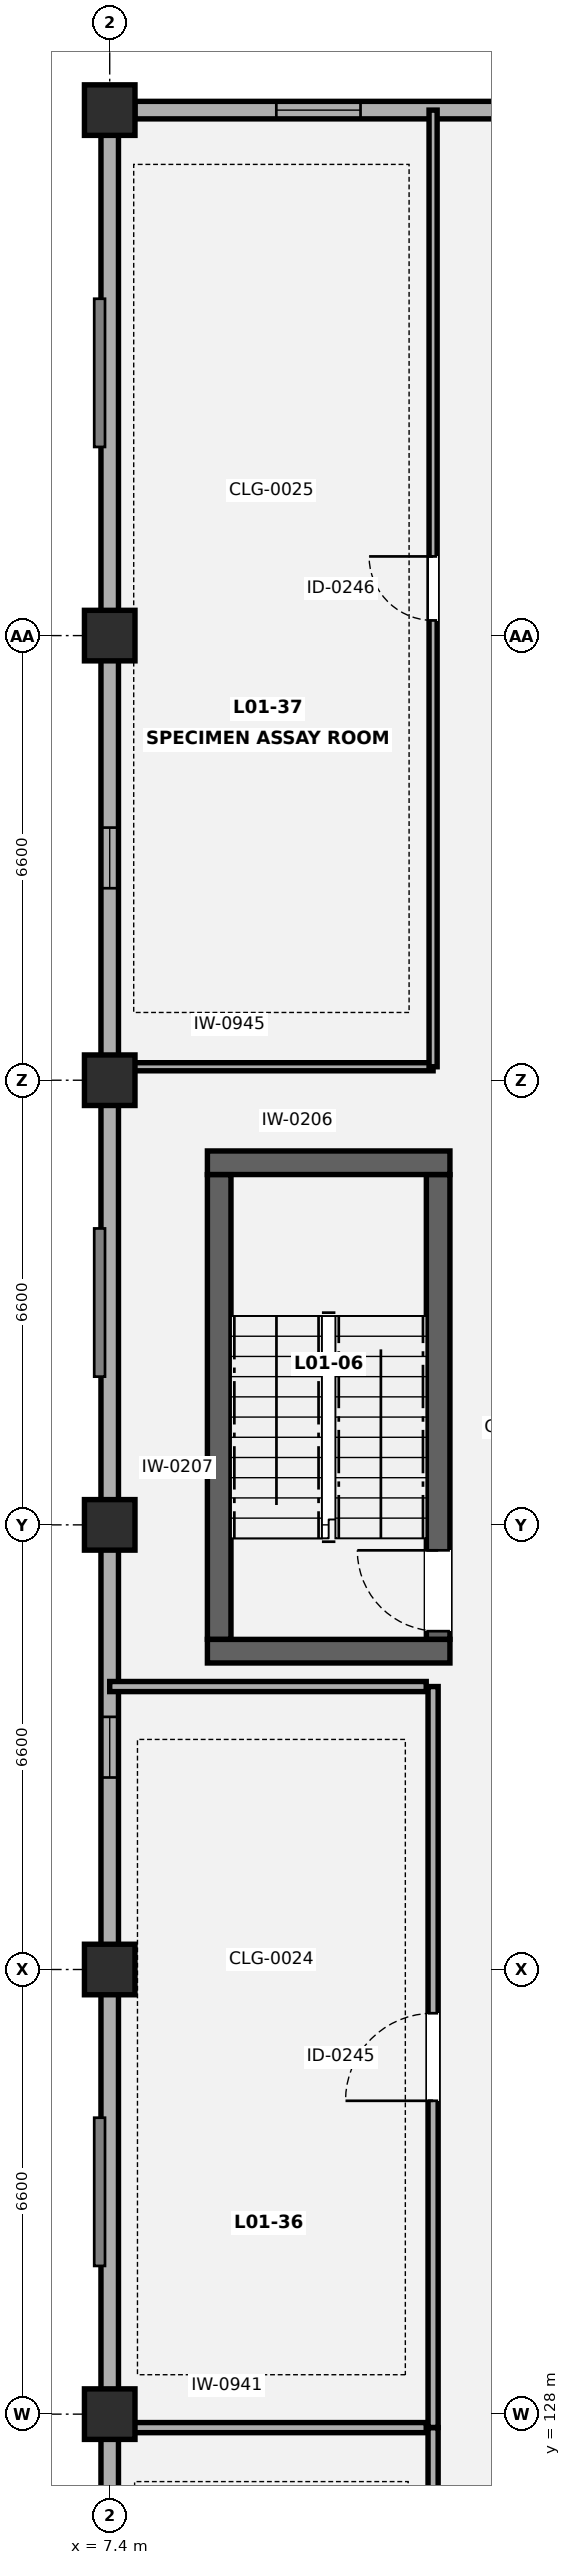
"""IFC4 building model, lengths in metres.
Left out: names, types, materials, properties, quantities, classifications, styles, units other than length and angle.
Written with IfcOpenShell. Run it as: python <this file> out.ifc"""

import sys

from ifc_helpers import new_model, si_unit, direction, frame, frame_2d, origin, origin_2d, place, context, subcontext, project, spatial, rectangle, extrude, element, fill, save


model = new_model("IFC4")
c1 = context("Model", 3, precision=1e-05, world=origin(), true_north=direction((0.0, 1.0)))
c2 = subcontext(c1, "Body", "Model", "MODEL_VIEW")
j1 = project(units=[si_unit("LENGTHUNIT", "METRE"), si_unit("PLANEANGLEUNIT", "RADIAN")], contexts=[c1])
p1 = place(None, origin())
s1 = spatial("IfcSite", under=j1, at=p1, CompositionType="ELEMENT")
p2 = place(p1, origin())
s2 = spatial("IfcBuilding", under=s1, at=p2, CompositionType="ELEMENT")
p3 = place(p2, frame((0.0, 0.0, 4.9)))
s3 = spatial("IfcBuildingStorey", under=s2, at=p3, CompositionType="ELEMENT", Elevation=4.9)
for number, where, z_axis, x_axis in (
    (1, (7.4, 128.0, 0.0), (0.0, 0.0, 1.0), (1.0, 0.0, 0.0)),
    (2, (7.4, 134.6, 0.0), (0.0, 0.0, 1.0), (1.0, 0.0, 0.0)),
    (3, (7.4, 141.2, 0.0), (0.0, 0.0, 1.0), (1.0, 0.0, 0.0)),
    (4, (7.4, 147.8, 0.0), (0.0, 0.0, 1.0), (1.0, 0.0, 0.0)),
    (5, (7.4, 154.4, 0.0), (0.0, 0.0, 1.0), (1.0, 0.0, 0.0)),
    (6, (7.4, 162.2, 0.0), (0.0, 0.0, 1.0), (1.0, 0.0, 0.0)),
):
    element("IfcColumn", number, at=place(p3, frame(where, z_axis=z_axis, x_axis=x_axis)), inside=s3, PredefinedType="COLUMN", context=c2, shape_type="SweptSolid", body=[
        extrude(rectangle(XDim=0.75, YDim=0.75, at=origin_2d()), origin(), (0.0, 0.0, 1.0), 4.2),
    ])
p4 = place(p3, frame((7.4, 95.373, 0.0), z_axis=(0.0, 0.0, 1.0), x_axis=(0.0, 1.0, 0.0)))
e7 = element("IfcWall", 7, at=p4, inside=s3, PredefinedType="SOLIDWALL", context=c2, shape_type="SweptSolid", body=[
    extrude(rectangle(XDim=66.454, YDim=0.26, at=frame_2d((33.227, 0.0))), origin(), (0.0, 0.0, 1.0), 2.885),
])
p5 = place(p4, frame((15.677, 0.0, 0.85)))
e8 = element("IfcOpeningElement", 8, at=p5, cuts=e7, PredefinedType="OPENING", context=c2, shape_type="SweptSolid", body=[
    extrude(rectangle(XDim=0.9, YDim=1.35, at=frame_2d((0.45, 0.675))), frame((0.0, 0.14, 0.0), z_axis=(0.0, -1.0, 0.0), x_axis=(1.0, 0.0, 0.0)), (0.0, 0.0, 1.0), 0.28),
])
p6 = place(p4, frame((28.877, 0.0, 0.85)))
e9 = element("IfcOpeningElement", 9, at=p6, cuts=e7, PredefinedType="OPENING", context=c2, shape_type="SweptSolid", body=[
    extrude(rectangle(XDim=0.9, YDim=1.35, at=frame_2d((0.45, 0.675))), frame((0.0, 0.14, 0.0), z_axis=(0.0, -1.0, 0.0), x_axis=(1.0, 0.0, 0.0)), (0.0, 0.0, 1.0), 0.28),
])
p7 = place(p4, frame((42.077, 0.0, 0.85)))
e10 = element("IfcOpeningElement", 10, at=p7, cuts=e7, PredefinedType="OPENING", context=c2, shape_type="SweptSolid", body=[
    extrude(rectangle(XDim=0.9, YDim=1.35, at=frame_2d((0.45, 0.675))), frame((0.0, 0.14, 0.0), z_axis=(0.0, -1.0, 0.0), x_axis=(1.0, 0.0, 0.0)), (0.0, 0.0, 1.0), 0.28),
])
p8 = place(p4, frame((55.277, 0.0, 0.85)))
e11 = element("IfcOpeningElement", 11, at=p8, cuts=e7, PredefinedType="OPENING", context=c2, shape_type="SweptSolid", body=[
    extrude(rectangle(XDim=0.9, YDim=1.35, at=frame_2d((0.45, 0.675))), frame((0.0, 0.14, 0.0), z_axis=(0.0, -1.0, 0.0), x_axis=(1.0, 0.0, 0.0)), (0.0, 0.0, 1.0), 0.28),
])
p9 = place(p3, frame((7.773, 162.2, 0.0), z_axis=(0.0, 0.0, 1.0), x_axis=(1.0, 0.0, 0.0)))
e12 = element("IfcWall", 12, at=p9, inside=s3, PredefinedType="SOLIDWALL", context=c2, shape_type="SweptSolid", body=[
    extrude(rectangle(XDim=5.854, YDim=0.26, at=frame_2d((2.927, 0.0))), origin(), (0.0, 0.0, 1.0), 2.48),
])
p10 = place(p9, frame((2.1, 0.0, 0.85)))
e13 = element("IfcOpeningElement", 13, at=p10, cuts=e12, PredefinedType="OPENING", context=c2, shape_type="SweptSolid", body=[
    extrude(rectangle(XDim=1.25, YDim=1.4, at=frame_2d((0.625, 0.7))), frame((0.0, 0.14, 0.0), z_axis=(0.0, -1.0, 0.0), x_axis=(1.0, 0.0, 0.0)), (0.0, 0.0, 1.0), 0.28),
])
for number, where, z_axis, x_axis in (
    (14, (8.85, 139.325, 0.0), (0.0, 0.0, 1.0), (1.0, 0.0, 0.0)),
    (15, (8.85, 146.575, 0.0), (0.0, 0.0, 1.0), (1.0, 0.0, 0.0)),
):
    element("IfcWall", number, at=place(p3, frame(where, z_axis=z_axis, x_axis=x_axis)), inside=s3, PredefinedType="SHEAR", context=c2, shape_type="SweptSolid", body=[
        extrude(rectangle(XDim=3.6, YDim=0.35, at=frame_2d((1.8, 0.0))), origin(), (0.0, 0.0, 1.0), 3.85),
    ])
p11 = place(p3, frame((9.025, 139.502, 0.0), z_axis=(0.0, 0.0, 1.0), x_axis=(0.0, 1.0, 0.0)))
e16 = element("IfcWall", 16, at=p11, inside=s3, PredefinedType="SHEAR", context=c2, shape_type="SweptSolid", body=[
    extrude(rectangle(XDim=6.896, YDim=0.35, at=frame_2d((3.448, 0.0))), origin(), (0.0, 0.0, 1.0), 3.85),
])
p12 = place(p3, frame((12.275, 139.502, 0.0), z_axis=(0.0, 0.0, 1.0), x_axis=(0.0, 1.0, 0.0)))
e17 = element("IfcWall", 17, at=p12, inside=s3, PredefinedType="SHEAR", context=c2, shape_type="SweptSolid", body=[
    extrude(rectangle(XDim=6.896, YDim=0.35, at=frame_2d((3.448, 0.0))), origin(), (0.0, 0.0, 1.0), 3.85),
])
p13 = place(p12, frame((0.12, 0.0, 0.0)))
e18 = element("IfcOpeningElement", 18, at=p13, cuts=e17, PredefinedType="OPENING", context=c2, shape_type="SweptSolid", body=[
    extrude(rectangle(XDim=1.2, YDim=2.15, at=frame_2d((0.6, 1.075))), frame((0.0, 0.185, 0.0), z_axis=(0.0, -1.0, 0.0), x_axis=(1.0, 0.0, 0.0)), (0.0, 0.0, 1.0), 0.37),
])
p14 = place(p3, frame((7.4, 127.8, 0.0), z_axis=(0.0, 0.0, 1.0), x_axis=(1.0, 0.0, 0.0)))
e19 = element("IfcWall", 19, at=p14, inside=s3, PredefinedType="PARTITIONING", context=c2, shape_type="SweptSolid", body=[
    extrude(rectangle(XDim=4.698, YDim=0.15, at=frame_2d((2.349, 0.0))), origin(), (0.0, 0.0, 1.0), 2.435),
])
p15 = place(p3, frame((12.2, 114.502, 0.0), z_axis=(0.0, 0.0, 1.0), x_axis=(0.0, 1.0, 0.0)))
e20 = element("IfcWall", 20, at=p15, inside=s3, PredefinedType="PARTITIONING", context=c2, shape_type="SweptSolid", body=[
    extrude(rectangle(XDim=13.298, YDim=0.15, at=frame_2d((6.649, 0.0))), origin(), (0.0, 0.0, 1.0), 3.85),
])
p16 = place(p15, frame((5.649, 0.0, 0.0)))
e21 = element("IfcOpeningElement", 21, at=p16, cuts=e20, PredefinedType="OPENING", context=c2, shape_type="SweptSolid", body=[
    extrude(rectangle(XDim=1.3, YDim=2.2, at=frame_2d((0.65, 1.1))), frame((0.0, 0.085, 0.0), z_axis=(0.0, -1.0, 0.0), x_axis=(1.0, 0.0, 0.0)), (0.0, 0.0, 1.0), 0.17),
])
p17 = place(p3, frame((7.4, 138.8, 0.0), z_axis=(0.0, 0.0, 1.0), x_axis=(1.0, 0.0, 0.0)))
e22 = element("IfcWall", 22, at=p17, inside=s3, PredefinedType="PARTITIONING", context=c2, shape_type="SweptSolid", body=[
    extrude(rectangle(XDim=4.698, YDim=0.15, at=frame_2d((2.349, 0.0))), origin(), (0.0, 0.0, 1.0), 3.85),
])
p18 = place(p3, frame((12.2, 127.802, 0.0), z_axis=(0.0, 0.0, 1.0), x_axis=(0.0, 1.0, 0.0)))
e23 = element("IfcWall", 23, at=p18, inside=s3, PredefinedType="PARTITIONING", context=c2, shape_type="SweptSolid", body=[
    extrude(rectangle(XDim=10.998, YDim=0.15, at=frame_2d((5.499, 0.0))), origin(), (0.0, 0.0, 1.0), 3.85),
])
p19 = place(p18, frame((4.849, 0.0, 0.0)))
e24 = element("IfcOpeningElement", 24, at=p19, cuts=e23, PredefinedType="OPENING", context=c2, shape_type="SweptSolid", body=[
    extrude(rectangle(XDim=1.3, YDim=2.2, at=frame_2d((0.65, 1.1))), frame((0.0, 0.085, 0.0), z_axis=(0.0, -1.0, 0.0), x_axis=(1.0, 0.0, 0.0)), (0.0, 0.0, 1.0), 0.17),
])
p20 = place(p3, frame((7.4, 148.0, 0.0), z_axis=(0.0, 0.0, 1.0), x_axis=(1.0, 0.0, 0.0)))
e25 = element("IfcWall", 25, at=p20, inside=s3, PredefinedType="PARTITIONING", context=c2, shape_type="SweptSolid", body=[
    extrude(rectangle(XDim=4.8, YDim=0.12, at=frame_2d((2.4, 0.0))), origin(), (0.0, 0.0, 1.0), 2.435),
])
p21 = place(p3, frame((12.2, 148.0, 0.0), z_axis=(0.0, 0.0, 1.0), x_axis=(0.0, 1.0, 0.0)))
e26 = element("IfcWall", 26, at=p21, inside=s3, PredefinedType="PARTITIONING", context=c2, shape_type="SweptSolid", body=[
    extrude(rectangle(XDim=14.2, YDim=0.12, at=frame_2d((7.1, 0.0))), origin(), (0.0, 0.0, 1.0), 3.85),
])
p22 = place(p21, frame((6.625, 0.0, 0.0)))
e27 = element("IfcOpeningElement", 27, at=p22, cuts=e26, PredefinedType="OPENING", context=c2, shape_type="SweptSolid", body=[
    extrude(rectangle(XDim=0.95, YDim=2.1, at=frame_2d((0.475, 1.05))), frame((0.0, 0.07, 0.0), z_axis=(0.0, -1.0, 0.0), x_axis=(1.0, 0.0, 0.0)), (0.0, 0.0, 1.0), 0.14),
])
p23 = place(p7, origin())
e28 = element("IfcWindow", 28, at=p23, inside=s3, PartitioningType="SINGLE_PANEL", PredefinedType="WINDOW", context=c2, shape_type="SweptSolid", body=[
    extrude(rectangle(XDim=0.9, YDim=1.35, at=frame_2d((0.45, 0.675))), frame((0.0, 0.03, 0.0), z_axis=(0.0, -1.0, 0.0), x_axis=(1.0, 0.0, 0.0)), (0.0, 0.0, 1.0), 0.06),
])
fill(e10, e28)
p24 = place(p8, origin())
e29 = element("IfcWindow", 29, at=p24, inside=s3, PartitioningType="SINGLE_PANEL", PredefinedType="WINDOW", context=c2, shape_type="SweptSolid", body=[
    extrude(rectangle(XDim=0.9, YDim=1.35, at=frame_2d((0.45, 0.675))), frame((0.0, 0.03, 0.0), z_axis=(0.0, -1.0, 0.0), x_axis=(1.0, 0.0, 0.0)), (0.0, 0.0, 1.0), 0.06),
])
fill(e11, e29)
p25 = place(p10, origin())
e30 = element("IfcWindow", 30, at=p25, inside=s3, PartitioningType="SINGLE_PANEL", PredefinedType="WINDOW", context=c2, shape_type="SweptSolid", body=[
    extrude(rectangle(XDim=1.25, YDim=1.4, at=frame_2d((0.625, 0.7))), frame((0.0, 0.03, 0.0), z_axis=(0.0, -1.0, 0.0), x_axis=(1.0, 0.0, 0.0)), (0.0, 0.0, 1.0), 0.06),
])
fill(e13, e30)
p26 = place(p13, origin())
e31 = element("IfcDoor", 31, at=p26, inside=s3, OperationType="SINGLE_SWING_RIGHT", PredefinedType="DOOR", context=c2, shape_type="SweptSolid", body=[
    extrude(rectangle(XDim=1.2, YDim=2.15, at=frame_2d((0.6, 1.075))), frame((0.0, 0.025, 0.0), z_axis=(0.0, -1.0, 0.0), x_axis=(1.0, 0.0, 0.0)), (0.0, 0.0, 1.0), 0.05),
])
fill(e18, e31)
p27 = place(p19, origin())
e32 = element("IfcDoor", 32, at=p27, inside=s3, OperationType="SINGLE_SWING_LEFT", PredefinedType="DOOR", context=c2, shape_type="SweptSolid", body=[
    extrude(rectangle(XDim=1.3, YDim=2.2, at=frame_2d((0.65, 1.1))), frame((0.0, 0.025, 0.0), z_axis=(0.0, -1.0, 0.0), x_axis=(1.0, 0.0, 0.0)), (0.0, 0.0, 1.0), 0.05),
])
fill(e24, e32)
p28 = place(p22, origin())
e33 = element("IfcDoor", 33, at=p28, inside=s3, OperationType="SINGLE_SWING_RIGHT", PredefinedType="DOOR", context=c2, shape_type="SweptSolid", body=[
    extrude(rectangle(XDim=0.95, YDim=2.1, at=frame_2d((0.475, 1.05))), frame((0.0, 0.025, 0.0), z_axis=(0.0, -1.0, 0.0), x_axis=(1.0, 0.0, 0.0)), (0.0, 0.0, 1.0), 0.05),
])
fill(e27, e33)
save(model, sys.argv[1])
